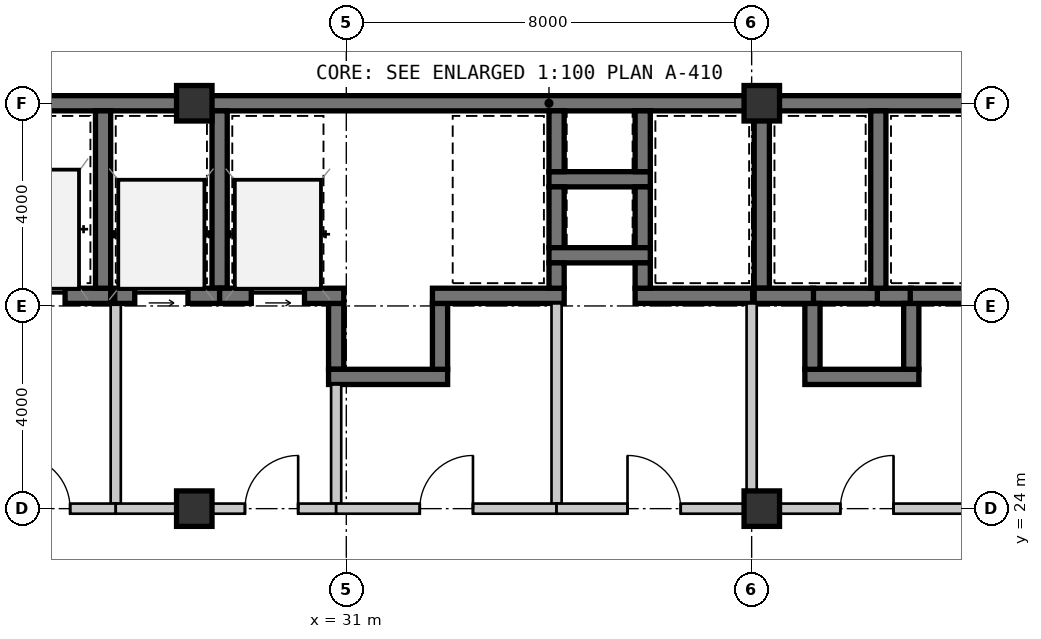
"""IFC4 building model, lengths in metres.
Left out: names, types, materials, properties, quantities, classifications, styles, units other than length and angle.
Written with IfcOpenShell. Run it as: python <this file> out.ifc"""

import sys

from ifc_helpers import new_model, si_unit, direction, frame, frame_2d, origin, origin_2d, place, context, subcontext, project, spatial, rectangle, extrude, source, transform, mapped, element, fill, save


model = new_model("IFC4")
c1 = context("Model", 3, precision=1e-05, world=origin(), true_north=direction((0.0, 1.0)))
c2 = subcontext(c1, "Body", "Model", "MODEL_VIEW")
j1 = project(units=[si_unit("LENGTHUNIT", "METRE"), si_unit("PLANEANGLEUNIT", "RADIAN")], contexts=[c1])
p1 = place(None, origin())
s1 = spatial("IfcSite", under=j1, at=p1, CompositionType="ELEMENT")
p2 = place(p1, origin())
s2 = spatial("IfcBuilding", under=s1, at=p2, CompositionType="ELEMENT")
p3 = place(p2, frame((0.0, 0.0, 93.45)))
s3 = spatial("IfcBuildingStorey", under=s2, at=p3, CompositionType="ELEMENT", Elevation=93.45)
m1 = source(origin(), c2, "Body", "SweptSolid", [
    extrude(rectangle(XDim=0.7, YDim=0.7, at=origin_2d()), origin(), (0.0, 0.0, 1.0), 3.15),
])
for number, where, z_axis, x_axis in (
    (1, (28.0, 24.0, 0.0), (0.0, 0.0, 1.0), (1.0, 0.0, 0.0)),
    (2, (39.2, 24.0, 0.0), (0.0, 0.0, 1.0), (1.0, 0.0, 0.0)),
    (3, (28.0, 32.0, 0.0), (0.0, 0.0, 1.0), (1.0, 0.0, 0.0)),
    (4, (39.2, 32.0, 0.0), (0.0, 0.0, 1.0), (1.0, 0.0, 0.0)),
):
    element("IfcColumn", number, at=place(p3, frame(where, z_axis=z_axis, x_axis=x_axis)), inside=s3, PredefinedType="COLUMN", context=c2, shape_type="MappedRepresentation", body=[
        mapped(m1, transform((0.0, 0.0, 0.0), scale=1.0)),
    ])
m2 = source(origin(), c2, "Body", "SweptSolid", [
    extrude(rectangle(XDim=9.15, YDim=0.3, at=frame_2d((4.575, 0.0))), origin(), (0.0, 0.0, 1.0), 2.93),
])
p4 = place(p3, frame((18.85, 32.0, 0.0), z_axis=(0.0, 0.0, 1.0), x_axis=(1.0, 0.0, 0.0)))
e5 = element("IfcWall", 5, at=p4, inside=s3, PredefinedType="SHEAR", context=c2, shape_type="MappedRepresentation", body=[
    mapped(m2, transform((0.0, 0.0, 0.0), scale=1.0)),
])
m3 = source(origin(), c2, "Body", "SweptSolid", [
    extrude(rectangle(XDim=11.2, YDim=0.3, at=frame_2d((5.6, 0.0))), origin(), (0.0, 0.0, 1.0), 2.93),
])
p5 = place(p3, frame((28.0, 32.0, 0.0), z_axis=(0.0, 0.0, 1.0), x_axis=(1.0, 0.0, 0.0)))
e6 = element("IfcWall", 6, at=p5, inside=s3, PredefinedType="SHEAR", context=c2, shape_type="MappedRepresentation", body=[
    mapped(m3, transform((0.0, 0.0, 0.0), scale=1.0)),
])
m4 = source(origin(), c2, "Body", "SweptSolid", [
    extrude(rectangle(XDim=11.95, YDim=0.3, at=frame_2d((5.975, 0.0))), origin(), (0.0, 0.0, 1.0), 2.93),
])
p6 = place(p3, frame((39.2, 32.0, 0.0), z_axis=(0.0, 0.0, 1.0), x_axis=(1.0, 0.0, 0.0)))
e7 = element("IfcWall", 7, at=p6, inside=s3, PredefinedType="SHEAR", context=c2, shape_type="MappedRepresentation", body=[
    mapped(m4, transform((0.0, 0.0, 0.0), scale=1.0)),
])
m5 = source(origin(), c2, "Body", "SweptSolid", [
    extrude(rectangle(XDim=2.9, YDim=0.3, at=frame_2d((1.45, 0.0))), origin(), (0.0, 0.0, 1.0), 2.93),
])
p7 = place(p3, frame((23.45, 28.2, 0.0), z_axis=(0.0, 0.0, 1.0), x_axis=(1.0, 0.0, 0.0)))
e8 = element("IfcWall", 8, at=p7, inside=s3, PredefinedType="SHEAR", context=c2, shape_type="MappedRepresentation", body=[
    mapped(m5, transform((0.0, 0.0, 0.0), scale=1.0)),
])
m6 = source(origin(), c2, "Body", "SweptSolid", [
    extrude(rectangle(XDim=1.1, YDim=2.15, at=frame_2d((0.55, 1.075))), frame((0.0, 0.16, 0.0), z_axis=(0.0, -1.0, 0.0), x_axis=(1.0, 0.0, 0.0)), (0.0, 0.0, 1.0), 0.32),
])
p8 = place(p7, frame((0.9, 0.0, 0.0)))
e9 = element("IfcOpeningElement", 9, at=p8, cuts=e8, PredefinedType="OPENING", context=c2, shape_type="MappedRepresentation", body=[
    mapped(m6, transform((0.0, 0.0, 0.0), scale=1.0)),
])
m7 = source(origin(), c2, "Body", "SweptSolid", [
    extrude(rectangle(XDim=3.5, YDim=0.3, at=frame_2d((1.75, 0.0))), origin(), (0.0, 0.0, 1.0), 2.93),
])
p9 = place(p3, frame((26.2, 28.35, 0.0), z_axis=(0.0, 0.0, 1.0), x_axis=(0.0, 1.0, 0.0)))
e10 = element("IfcWall", 10, at=p9, inside=s3, PredefinedType="SHEAR", context=c2, shape_type="MappedRepresentation", body=[
    mapped(m7, transform((0.0, 0.0, 0.0), scale=1.0)),
])
m8 = source(origin(), c2, "Body", "SweptSolid", [
    extrude(rectangle(XDim=3.95, YDim=0.2, at=frame_2d((1.975, 0.0))), origin(), (0.0, 0.0, 1.0), 2.93),
])
p10 = place(p3, frame((26.45, 24.1, 0.0), z_axis=(0.0, 0.0, 1.0), x_axis=(0.0, 1.0, 0.0)))
e11 = element("IfcWall", 11, at=p10, inside=s3, PredefinedType="SOLIDWALL", context=c2, shape_type="MappedRepresentation", body=[
    mapped(m8, transform((0.0, 0.0, 0.0), scale=1.0)),
])
m9 = source(origin(), c2, "Body", "SweptSolid", [
    extrude(rectangle(XDim=2.7, YDim=0.2, at=frame_2d((1.35, 0.0))), origin(), (0.0, 0.0, 1.0), 2.47),
])
p11 = place(p3, frame((23.75, 24.0, 0.0), z_axis=(0.0, 0.0, 1.0), x_axis=(1.0, 0.0, 0.0)))
e12 = element("IfcWall", 12, at=p11, inside=s3, PredefinedType="SOLIDWALL", context=c2, shape_type="MappedRepresentation", body=[
    mapped(m9, transform((0.0, 0.0, 0.0), scale=1.0)),
])
m10 = source(origin(), c2, "Body", "SweptSolid", [
    extrude(rectangle(XDim=1.05, YDim=2.1, at=frame_2d((0.525, 1.05))), frame((0.0, 0.11, 0.0), z_axis=(0.0, -1.0, 0.0), x_axis=(1.0, 0.0, 0.0)), (0.0, 0.0, 1.0), 0.22),
])
p12 = place(p11, frame((0.75, 0.0, 0.0)))
e13 = element("IfcOpeningElement", 13, at=p12, cuts=e12, PredefinedType="OPENING", context=c2, shape_type="MappedRepresentation", body=[
    mapped(m10, transform((0.0, 0.0, 0.0), scale=1.0)),
])
m11 = source(origin(), c2, "Body", "SweptSolid", [
    extrude(rectangle(XDim=2.0, YDim=0.3, at=frame_2d((1.0, 0.0))), origin(), (0.0, 0.0, 1.0), 2.93),
])
p13 = place(p3, frame((35.0, 30.5, 0.0), z_axis=(0.0, 0.0, 1.0), x_axis=(1.0, 0.0, 0.0)))
e14 = element("IfcWall", 14, at=p13, inside=s3, PredefinedType="SHEAR", context=c2, shape_type="MappedRepresentation", body=[
    mapped(m11, transform((0.0, 0.0, 0.0), scale=1.0)),
])
m12 = source(origin(), c2, "Body", "SweptSolid", [
    extrude(rectangle(XDim=1.2, YDim=0.3, at=frame_2d((0.6, 0.0))), origin(), (0.0, 0.0, 1.0), 2.93),
])
for number, where, z_axis, x_axis in (
    (15, (35.15, 31.85, 0.0), (0.0, 0.0, 1.0), (0.0, -1.0, 0.0)),
    (16, (36.85, 30.65, 0.0), (0.0, 0.0, 1.0), (0.0, 1.0, 0.0)),
    (17, (35.15, 30.35, 0.0), (0.0, 0.0, 1.0), (0.0, -1.0, 0.0)),
    (18, (36.85, 29.15, 0.0), (0.0, 0.0, 1.0), (0.0, 1.0, 0.0)),
):
    element("IfcWall", number, at=place(p3, frame(where, z_axis=z_axis, x_axis=x_axis)), inside=s3, PredefinedType="SHEAR", context=c2, shape_type="MappedRepresentation", body=[
        mapped(m12, transform((0.0, 0.0, 0.0), scale=1.0)),
    ])
p14 = place(p3, frame((35.0, 29.0, 0.0), z_axis=(0.0, 0.0, 1.0), x_axis=(1.0, 0.0, 0.0)))
e19 = element("IfcWall", 19, at=p14, inside=s3, PredefinedType="SHEAR", context=c2, shape_type="MappedRepresentation", body=[
    mapped(m11, transform((0.0, 0.0, 0.0), scale=1.0)),
])
m13 = source(origin(), c2, "Body", "SweptSolid", [
    extrude(rectangle(XDim=1.3, YDim=0.3, at=frame_2d((0.65, 0.0))), origin(), (0.0, 0.0, 1.0), 2.93),
])
p15 = place(p3, frame((30.8, 28.05, 0.0), z_axis=(0.0, 0.0, 1.0), x_axis=(0.0, -1.0, 0.0)))
e20 = element("IfcWall", 20, at=p15, inside=s3, PredefinedType="SHEAR", context=c2, shape_type="MappedRepresentation", body=[
    mapped(m13, transform((0.0, 0.0, 0.0), scale=1.0)),
])
m14 = source(origin(), c2, "Body", "SweptSolid", [
    extrude(rectangle(XDim=2.35, YDim=0.3, at=frame_2d((1.175, 0.0))), origin(), (0.0, 0.0, 1.0), 2.93),
])
p16 = place(p3, frame((30.65, 26.6, 0.0), z_axis=(0.0, 0.0, 1.0), x_axis=(1.0, 0.0, 0.0)))
e21 = element("IfcWall", 21, at=p16, inside=s3, PredefinedType="SHEAR", context=c2, shape_type="MappedRepresentation", body=[
    mapped(m14, transform((0.0, 0.0, 0.0), scale=1.0)),
])
p17 = place(p3, frame((32.85, 26.75, 0.0), z_axis=(0.0, 0.0, 1.0), x_axis=(0.0, 1.0, 0.0)))
e22 = element("IfcWall", 22, at=p17, inside=s3, PredefinedType="SHEAR", context=c2, shape_type="MappedRepresentation", body=[
    mapped(m13, transform((0.0, 0.0, 0.0), scale=1.0)),
])
m15 = source(origin(), c2, "Body", "SweptSolid", [
    extrude(rectangle(XDim=1.32, YDim=0.3, at=frame_2d((0.66, 0.0))), origin(), (0.0, 0.0, 1.0), 2.93),
])
p18 = place(p3, frame((41.52, 28.2, 0.0), z_axis=(0.0, 0.0, 1.0), x_axis=(-1.0, 0.0, 0.0)))
e23 = element("IfcWall", 23, at=p18, inside=s3, PredefinedType="SHEAR", context=c2, shape_type="MappedRepresentation", body=[
    mapped(m15, transform((0.0, 0.0, 0.0), scale=1.0)),
])
m16 = source(origin(), c2, "Body", "SweptSolid", [
    extrude(rectangle(XDim=0.67, YDim=0.3, at=frame_2d((0.335, 0.0))), origin(), (0.0, 0.0, 1.0), 2.93),
])
p19 = place(p3, frame((42.15, 28.2, 0.0), z_axis=(0.0, 0.0, 1.0), x_axis=(-1.0, 0.0, 0.0)))
e24 = element("IfcWall", 24, at=p19, inside=s3, PredefinedType="SHEAR", context=c2, shape_type="MappedRepresentation", body=[
    mapped(m16, transform((0.0, 0.0, 0.0), scale=1.0)),
])
m17 = source(origin(), c2, "Body", "SweptSolid", [
    extrude(rectangle(XDim=2.25, YDim=0.3, at=frame_2d((1.125, 0.0))), origin(), (0.0, 0.0, 1.0), 2.93),
])
p20 = place(p3, frame((40.05, 26.6, 0.0), z_axis=(0.0, 0.0, 1.0), x_axis=(1.0, 0.0, 0.0)))
e25 = element("IfcWall", 25, at=p20, inside=s3, PredefinedType="SHEAR", context=c2, shape_type="MappedRepresentation", body=[
    mapped(m17, transform((0.0, 0.0, 0.0), scale=1.0)),
])
for number, where, z_axis, x_axis in (
    (26, (40.2, 28.05, 0.0), (0.0, 0.0, 1.0), (0.0, -1.0, 0.0)),
    (27, (42.15, 26.75, 0.0), (0.0, 0.0, 1.0), (0.0, 1.0, 0.0)),
):
    element("IfcWall", number, at=place(p3, frame(where, z_axis=z_axis, x_axis=x_axis)), inside=s3, PredefinedType="SHEAR", context=c2, shape_type="MappedRepresentation", body=[
        mapped(m13, transform((0.0, 0.0, 0.0), scale=1.0)),
    ])
p21 = place(p3, frame((28.5, 28.35, 0.0), z_axis=(0.0, 0.0, 1.0), x_axis=(0.0, 1.0, 0.0)))
e28 = element("IfcWall", 28, at=p21, inside=s3, PredefinedType="SHEAR", context=c2, shape_type="MappedRepresentation", body=[
    mapped(m7, transform((0.0, 0.0, 0.0), scale=1.0)),
])
m18 = source(origin(), c2, "Body", "SweptSolid", [
    extrude(rectangle(XDim=2.07, YDim=0.3, at=frame_2d((1.035, 0.0))), origin(), (0.0, 0.0, 1.0), 2.93),
])
p22 = place(p3, frame((26.43, 28.2, 0.0), z_axis=(0.0, 0.0, 1.0), x_axis=(1.0, 0.0, 0.0)))
e29 = element("IfcWall", 29, at=p22, inside=s3, PredefinedType="SHEAR", context=c2, shape_type="MappedRepresentation", body=[
    mapped(m18, transform((0.0, 0.0, 0.0), scale=1.0)),
])
m19 = source(origin(), c2, "Body", "SweptSolid", [
    extrude(rectangle(XDim=1.05, YDim=2.15, at=frame_2d((0.525, 1.075))), frame((0.0, 0.16, 0.0), z_axis=(0.0, -1.0, 0.0), x_axis=(1.0, 0.0, 0.0)), (0.0, 0.0, 1.0), 0.32),
])
p23 = place(p22, frame((0.395, 0.0, 0.0)))
e30 = element("IfcOpeningElement", 30, at=p23, cuts=e29, PredefinedType="OPENING", context=c2, shape_type="MappedRepresentation", body=[
    mapped(m19, transform((0.0, 0.0, 0.0), scale=1.0)),
])
m20 = source(origin(), c2, "Body", "SweptSolid", [
    extrude(rectangle(XDim=2.45, YDim=0.3, at=frame_2d((1.225, 0.0))), origin(), (0.0, 0.0, 1.0), 2.93),
])
p24 = place(p3, frame((28.5, 28.2, 0.0), z_axis=(0.0, 0.0, 1.0), x_axis=(1.0, 0.0, 0.0)))
e31 = element("IfcWall", 31, at=p24, inside=s3, PredefinedType="SHEAR", context=c2, shape_type="MappedRepresentation", body=[
    mapped(m20, transform((0.0, 0.0, 0.0), scale=1.0)),
])
p25 = place(p24, frame((0.625, 0.0, 0.0)))
e32 = element("IfcOpeningElement", 32, at=p25, cuts=e31, PredefinedType="OPENING", context=c2, shape_type="MappedRepresentation", body=[
    mapped(m19, transform((0.0, 0.0, 0.0), scale=1.0)),
])
m21 = source(origin(), c2, "Body", "SweptSolid", [
    extrude(rectangle(XDim=2.35, YDim=0.2, at=frame_2d((1.175, 0.0))), origin(), (0.0, 0.0, 1.0), 2.93),
])
p26 = place(p3, frame((30.8, 26.45, 0.0), z_axis=(0.0, 0.0, 1.0), x_axis=(0.0, -1.0, 0.0)))
e33 = element("IfcWall", 33, at=p26, inside=s3, PredefinedType="SOLIDWALL", context=c2, shape_type="MappedRepresentation", body=[
    mapped(m21, transform((0.0, 0.0, 0.0), scale=1.0)),
])
m22 = source(origin(), c2, "Body", "SweptSolid", [
    extrude(rectangle(XDim=4.35, YDim=0.2, at=frame_2d((2.175, 0.0))), origin(), (0.0, 0.0, 1.0), 2.47),
])
p27 = place(p3, frame((30.8, 24.0, 0.0), z_axis=(0.0, 0.0, 1.0), x_axis=(-1.0, 0.0, 0.0)))
e34 = element("IfcWall", 34, at=p27, inside=s3, PredefinedType="SOLIDWALL", context=c2, shape_type="MappedRepresentation", body=[
    mapped(m22, transform((0.0, 0.0, 0.0), scale=1.0)),
])
p28 = place(p27, frame((0.75, 0.0, 0.0)))
e35 = element("IfcOpeningElement", 35, at=p28, cuts=e34, PredefinedType="OPENING", context=c2, shape_type="MappedRepresentation", body=[
    mapped(m10, transform((0.0, 0.0, 0.0), scale=1.0)),
])
m23 = source(origin(), c2, "Body", "SweptSolid", [
    extrude(rectangle(XDim=2.6, YDim=0.3, at=frame_2d((1.3, 0.0))), origin(), (0.0, 0.0, 1.0), 2.93),
])
p29 = place(p3, frame((32.7, 28.2, 0.0), z_axis=(0.0, 0.0, 1.0), x_axis=(1.0, 0.0, 0.0)))
e36 = element("IfcWall", 36, at=p29, inside=s3, PredefinedType="SHEAR", context=c2, shape_type="MappedRepresentation", body=[
    mapped(m23, transform((0.0, 0.0, 0.0), scale=1.0)),
])
m24 = source(origin(), c2, "Body", "SweptSolid", [
    extrude(rectangle(XDim=0.5, YDim=0.3, at=frame_2d((0.25, 0.0))), origin(), (0.0, 0.0, 1.0), 2.93),
])
p30 = place(p3, frame((35.15, 28.35, 0.0), z_axis=(0.0, 0.0, 1.0), x_axis=(0.0, 1.0, 0.0)))
e37 = element("IfcWall", 37, at=p30, inside=s3, PredefinedType="SHEAR", context=c2, shape_type="MappedRepresentation", body=[
    mapped(m24, transform((0.0, 0.0, 0.0), scale=1.0)),
])
p31 = place(p3, frame((39.2, 28.35, 0.0), z_axis=(0.0, 0.0, 1.0), x_axis=(0.0, 1.0, 0.0)))
e38 = element("IfcWall", 38, at=p31, inside=s3, PredefinedType="SHEAR", context=c2, shape_type="MappedRepresentation", body=[
    mapped(m7, transform((0.0, 0.0, 0.0), scale=1.0)),
])
m25 = source(origin(), c2, "Body", "SweptSolid", [
    extrude(rectangle(XDim=2.32, YDim=0.3, at=frame_2d((1.16, 0.0))), origin(), (0.0, 0.0, 1.0), 2.93),
])
p32 = place(p3, frame((36.7, 28.2, 0.0), z_axis=(0.0, 0.0, 1.0), x_axis=(1.0, 0.0, 0.0)))
e39 = element("IfcWall", 39, at=p32, inside=s3, PredefinedType="SHEAR", context=c2, shape_type="MappedRepresentation", body=[
    mapped(m25, transform((0.0, 0.0, 0.0), scale=1.0)),
])
p33 = place(p3, frame((36.85, 28.85, 0.0), z_axis=(0.0, 0.0, 1.0), x_axis=(0.0, -1.0, 0.0)))
e40 = element("IfcWall", 40, at=p33, inside=s3, PredefinedType="SHEAR", context=c2, shape_type="MappedRepresentation", body=[
    mapped(m24, transform((0.0, 0.0, 0.0), scale=1.0)),
])
p34 = place(p3, frame((41.5, 28.35, 0.0), z_axis=(0.0, 0.0, 1.0), x_axis=(0.0, 1.0, 0.0)))
e41 = element("IfcWall", 41, at=p34, inside=s3, PredefinedType="SHEAR", context=c2, shape_type="MappedRepresentation", body=[
    mapped(m7, transform((0.0, 0.0, 0.0), scale=1.0)),
])
m26 = source(origin(), c2, "Body", "SweptSolid", [
    extrude(rectangle(XDim=1.17, YDim=0.3, at=frame_2d((0.585, 0.0))), origin(), (0.0, 0.0, 1.0), 2.93),
])
p35 = place(p3, frame((39.05, 28.2, 0.0), z_axis=(0.0, 0.0, 1.0), x_axis=(1.0, 0.0, 0.0)))
e42 = element("IfcWall", 42, at=p35, inside=s3, PredefinedType="SHEAR", context=c2, shape_type="MappedRepresentation", body=[
    mapped(m26, transform((0.0, 0.0, 0.0), scale=1.0)),
])
m27 = source(origin(), c2, "Body", "SweptSolid", [
    extrude(rectangle(XDim=1.44, YDim=0.3, at=frame_2d((0.72, 0.0))), origin(), (0.0, 0.0, 1.0), 2.93),
])
p36 = place(p3, frame((42.13, 28.2, 0.0), z_axis=(0.0, 0.0, 1.0), x_axis=(1.0, 0.0, 0.0)))
e43 = element("IfcWall", 43, at=p36, inside=s3, PredefinedType="SHEAR", context=c2, shape_type="MappedRepresentation", body=[
    mapped(m27, transform((0.0, 0.0, 0.0), scale=1.0)),
])
p37 = place(p3, frame((35.15, 28.05, 0.0), z_axis=(0.0, 0.0, 1.0), x_axis=(0.0, -1.0, 0.0)))
e44 = element("IfcWall", 44, at=p37, inside=s3, PredefinedType="SOLIDWALL", context=c2, shape_type="MappedRepresentation", body=[
    mapped(m8, transform((0.0, 0.0, 0.0), scale=1.0)),
])
m28 = source(origin(), c2, "Body", "SweptSolid", [
    extrude(rectangle(XDim=4.35, YDim=0.2, at=frame_2d((2.175, 0.0))), origin(), (0.0, 0.0, 1.0), 2.47),
])
p38 = place(p3, frame((35.15, 24.0, 0.0), z_axis=(0.0, 0.0, 1.0), x_axis=(-1.0, 0.0, 0.0)))
e45 = element("IfcWall", 45, at=p38, inside=s3, PredefinedType="SOLIDWALL", context=c2, shape_type="MappedRepresentation", body=[
    mapped(m28, transform((0.0, 0.0, 0.0), scale=1.0)),
])
p39 = place(p38, frame((1.65, 0.0, 0.0)))
e46 = element("IfcOpeningElement", 46, at=p39, cuts=e45, PredefinedType="OPENING", context=c2, shape_type="MappedRepresentation", body=[
    mapped(m10, transform((0.0, 0.0, 0.0), scale=1.0)),
])
p40 = place(p3, frame((39.0, 28.05, 0.0), z_axis=(0.0, 0.0, 1.0), x_axis=(0.0, -1.0, 0.0)))
e47 = element("IfcWall", 47, at=p40, inside=s3, PredefinedType="SOLIDWALL", context=c2, shape_type="MappedRepresentation", body=[
    mapped(m8, transform((0.0, 0.0, 0.0), scale=1.0)),
])
m29 = source(origin(), c2, "Body", "SweptSolid", [
    extrude(rectangle(XDim=3.85, YDim=0.2, at=frame_2d((1.925, 0.0))), origin(), (0.0, 0.0, 1.0), 2.47),
])
p41 = place(p3, frame((39.0, 24.0, 0.0), z_axis=(0.0, 0.0, 1.0), x_axis=(-1.0, 0.0, 0.0)))
e48 = element("IfcWall", 48, at=p41, inside=s3, PredefinedType="SOLIDWALL", context=c2, shape_type="MappedRepresentation", body=[
    mapped(m29, transform((0.0, 0.0, 0.0), scale=1.0)),
])
p42 = place(p41, frame((1.4, 0.0, 0.0)))
e49 = element("IfcOpeningElement", 49, at=p42, cuts=e48, PredefinedType="OPENING", context=c2, shape_type="MappedRepresentation", body=[
    mapped(m10, transform((0.0, 0.0, 0.0), scale=1.0)),
])
m30 = source(origin(), c2, "Body", "SweptSolid", [
    extrude(rectangle(XDim=4.55, YDim=0.2, at=frame_2d((2.275, 0.0))), origin(), (0.0, 0.0, 1.0), 2.397),
])
p43 = place(p3, frame((43.55, 24.0, 0.0), z_axis=(0.0, 0.0, 1.0), x_axis=(-1.0, 0.0, 0.0)))
e50 = element("IfcWall", 50, at=p43, inside=s3, PredefinedType="SOLIDWALL", context=c2, shape_type="MappedRepresentation", body=[
    mapped(m30, transform((0.0, 0.0, 0.0), scale=1.0)),
])
p44 = place(p43, frame((1.75, 0.0, 0.0)))
e51 = element("IfcOpeningElement", 51, at=p44, cuts=e50, PredefinedType="OPENING", context=c2, shape_type="MappedRepresentation", body=[
    mapped(m10, transform((0.0, 0.0, 0.0), scale=1.0)),
])
m31 = source(origin(), c2, "Body", "SweptSolid", [
    extrude(rectangle(XDim=1.1, YDim=2.15, at=frame_2d((0.55, 1.075))), frame((0.0, 0.025, 0.0), z_axis=(0.0, -1.0, 0.0), x_axis=(1.0, 0.0, 0.0)), (0.0, 0.0, 1.0), 0.05),
])
p45 = place(p8, origin())
e52 = element("IfcDoor", 52, at=p45, inside=s3, OperationType="SLIDING_TO_LEFT", PredefinedType="DOOR", context=c2, shape_type="MappedRepresentation", body=[
    mapped(m31, transform((0.0, 0.0, 0.0), scale=1.0)),
])
fill(e9, e52)
m32 = source(origin(), c2, "Body", "SweptSolid", [
    extrude(rectangle(XDim=1.05, YDim=2.1, at=frame_2d((0.525, 1.05))), frame((0.0, 0.025, 0.0), z_axis=(0.0, -1.0, 0.0), x_axis=(1.0, 0.0, 0.0)), (0.0, 0.0, 1.0), 0.05),
])
p46 = place(p12, origin())
e53 = element("IfcDoor", 53, at=p46, inside=s3, OperationType="SINGLE_SWING_LEFT", PredefinedType="DOOR", context=c2, shape_type="MappedRepresentation", body=[
    mapped(m32, transform((0.0, 0.0, 0.0), scale=1.0)),
])
fill(e13, e53)
m33 = source(origin(), c2, "Body", "SweptSolid", [
    extrude(rectangle(XDim=1.05, YDim=2.15, at=frame_2d((0.525, 1.075))), frame((0.0, 0.025, 0.0), z_axis=(0.0, -1.0, 0.0), x_axis=(1.0, 0.0, 0.0)), (0.0, 0.0, 1.0), 0.05),
])
p47 = place(p23, origin())
e54 = element("IfcDoor", 54, at=p47, inside=s3, OperationType="SLIDING_TO_LEFT", PredefinedType="DOOR", context=c2, shape_type="MappedRepresentation", body=[
    mapped(m33, transform((0.0, 0.0, 0.0), scale=1.0)),
])
fill(e30, e54)
p48 = place(p25, origin())
e55 = element("IfcDoor", 55, at=p48, inside=s3, OperationType="SLIDING_TO_LEFT", PredefinedType="DOOR", context=c2, shape_type="MappedRepresentation", body=[
    mapped(m33, transform((0.0, 0.0, 0.0), scale=1.0)),
])
fill(e32, e55)
p49 = place(p28, frame((1.05, 0.0, 0.0), z_axis=(0.0, 0.0, 1.0), x_axis=(-1.0, 0.0, 0.0)))
e56 = element("IfcDoor", 56, at=p49, inside=s3, OperationType="SINGLE_SWING_RIGHT", PredefinedType="DOOR", context=c2, shape_type="MappedRepresentation", body=[
    mapped(m32, transform((0.0, 0.0, 0.0), scale=1.0)),
])
fill(e35, e56)
p50 = place(p39, frame((1.05, 0.0, 0.0), z_axis=(0.0, 0.0, 1.0), x_axis=(-1.0, 0.0, 0.0)))
e57 = element("IfcDoor", 57, at=p50, inside=s3, OperationType="SINGLE_SWING_RIGHT", PredefinedType="DOOR", context=c2, shape_type="MappedRepresentation", body=[
    mapped(m32, transform((0.0, 0.0, 0.0), scale=1.0)),
])
fill(e46, e57)
p51 = place(p42, frame((1.05, 0.0, 0.0), z_axis=(0.0, 0.0, 1.0), x_axis=(-1.0, 0.0, 0.0)))
e58 = element("IfcDoor", 58, at=p51, inside=s3, OperationType="SINGLE_SWING_LEFT", PredefinedType="DOOR", context=c2, shape_type="MappedRepresentation", body=[
    mapped(m32, transform((0.0, 0.0, 0.0), scale=1.0)),
])
fill(e49, e58)
p52 = place(p44, frame((1.05, 0.0, 0.0), z_axis=(0.0, 0.0, 1.0), x_axis=(-1.0, 0.0, 0.0)))
e59 = element("IfcDoor", 59, at=p52, inside=s3, OperationType="SINGLE_SWING_RIGHT", PredefinedType="DOOR", context=c2, shape_type="MappedRepresentation", body=[
    mapped(m32, transform((0.0, 0.0, 0.0), scale=1.0)),
])
fill(e51, e59)
save(model, sys.argv[1])
